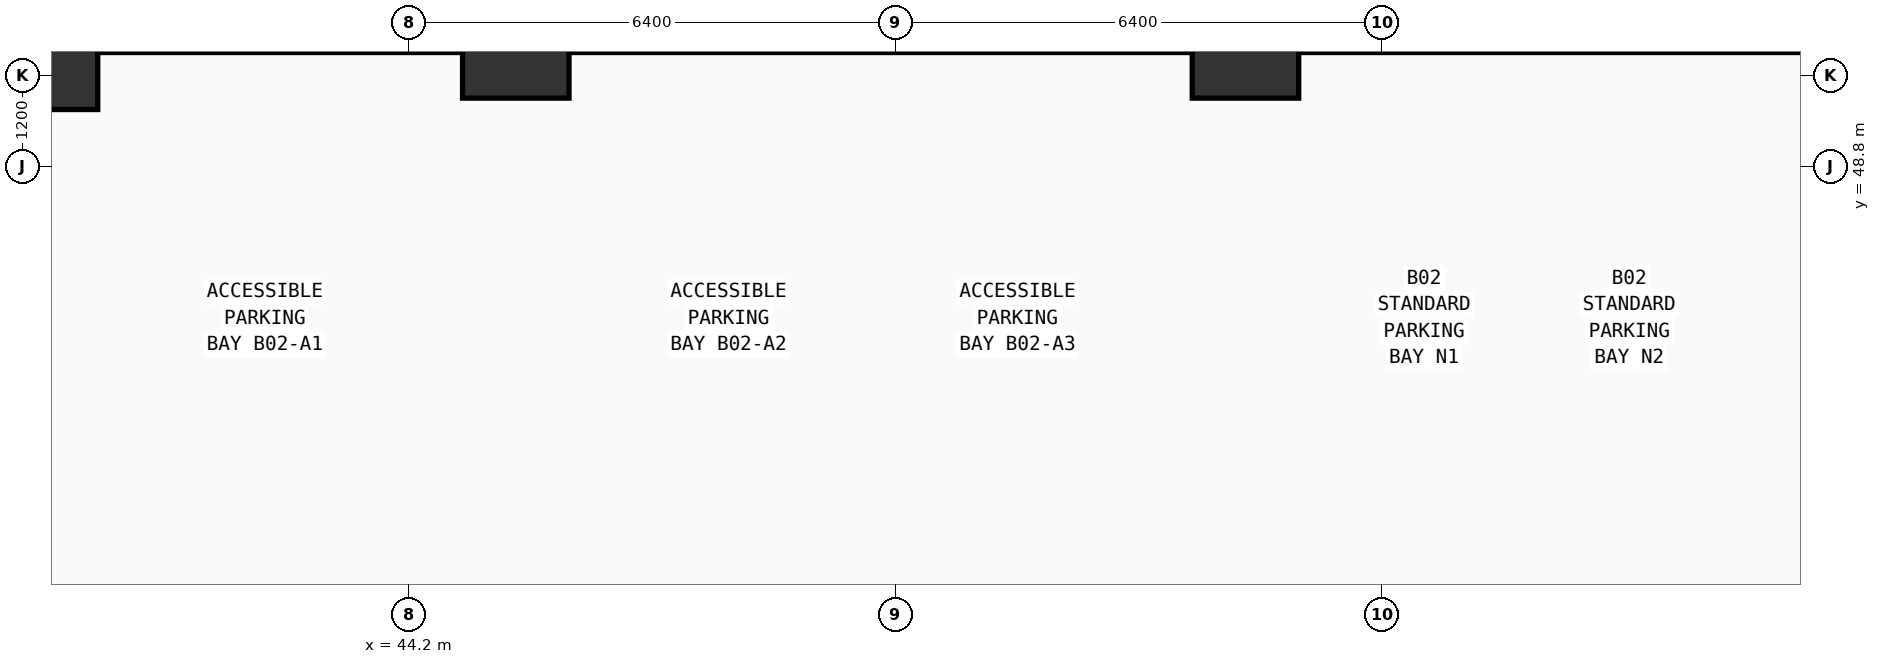
"""IFC4 building model, lengths in metres.
Left out: names, types, materials, properties, quantities, classifications, styles, units other than length and angle.
Written with IfcOpenShell. Run it as: python <this file> out.ifc"""

import sys

from ifc_helpers import new_model, si_unit, direction, frame, origin, origin_2d, place, context, subcontext, project, spatial, rectangle, extrude, element, save


model = new_model("IFC4")
c1 = context("Model", 3, precision=1e-05, world=origin(), true_north=direction((0.0, 1.0)))
c2 = subcontext(c1, "Body", "Model", "MODEL_VIEW")
j1 = project(units=[si_unit("LENGTHUNIT", "METRE"), si_unit("PLANEANGLEUNIT", "RADIAN")], contexts=[c1])
p1 = place(None, origin())
s1 = spatial("IfcSite", under=j1, at=p1, CompositionType="ELEMENT")
p2 = place(p1, origin())
s2 = spatial("IfcBuilding", under=s1, at=p2, CompositionType="ELEMENT")
p3 = place(p2, frame((0.0, 0.0, -8.4)))
s3 = spatial("IfcBuildingStorey", under=s2, at=p3, CompositionType="ELEMENT", Elevation=-8.4)
for number, where, z_axis, x_axis in (
    (1, (39.4, 50.25, 0.0), (0.0, 0.0, 1.0), (1.0, 0.0, 0.0)),
    (2, (45.6, 50.4, 0.0), (0.0, 0.0, 1.0), (1.0, 0.0, 0.0)),
    (3, (55.2, 50.4, 0.0), (0.0, 0.0, 1.0), (1.0, 0.0, 0.0)),
):
    element("IfcColumn", number, at=place(p3, frame(where, z_axis=z_axis, x_axis=x_axis)), inside=s3, PredefinedType="COLUMN", context=c2, shape_type="SweptSolid", body=[
        extrude(rectangle(XDim=1.4, YDim=1.4, at=origin_2d()), origin(), (0.0, 0.0, 1.0), 3.86),
    ])
save(model, sys.argv[1])
